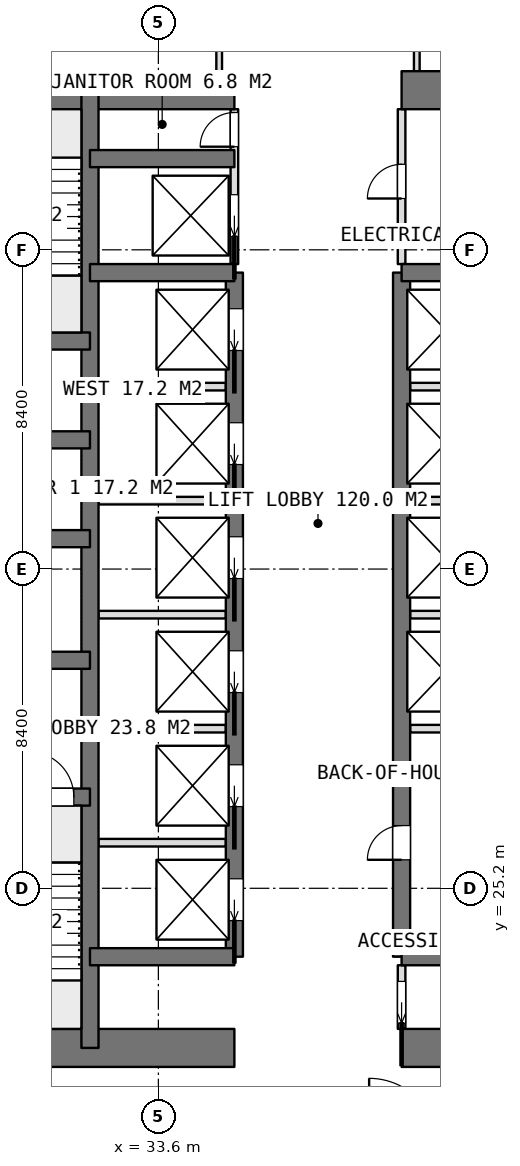
"""IFC4 building model, lengths in metres.
Left out: names, types, materials, properties, quantities, classifications, styles, units other than length and angle.
Written with IfcOpenShell. Run it as: python <this file> out.ifc"""

import sys

from ifc_helpers import new_model, si_unit, direction, frame, frame_2d, origin, place, context, subcontext, project, spatial, rectangle, extrude, element, fill, save


model = new_model("IFC4")
c1 = context("Model", 3, precision=1e-05, world=origin(), true_north=direction((0.0, 1.0)))
c2 = subcontext(c1, "Body", "Model", "MODEL_VIEW")
j1 = project(units=[si_unit("LENGTHUNIT", "METRE"), si_unit("PLANEANGLEUNIT", "RADIAN")], contexts=[c1])
p1 = place(None, origin())
s1 = spatial("IfcSite", under=j1, at=p1, CompositionType="ELEMENT")
p2 = place(p1, origin())
s2 = spatial("IfcBuilding", under=s1, at=p2, CompositionType="ELEMENT")
p3 = place(p2, frame((0.0, 0.0, 147.8)))
s3 = spatial("IfcBuildingStorey", under=s2, at=p3, CompositionType="ELEMENT", Elevation=147.8)
p4 = place(p3, frame((25.2, 21.0, 0.0), z_axis=(0.0, 0.0, 1.0), x_axis=(1.0, 0.0, 0.0)))
e1 = element("IfcWall", 1, at=p4, inside=s3, PredefinedType="SHEAR", context=c2, shape_type="SweptSolid", body=[
    extrude(rectangle(XDim=10.4, YDim=1.0, at=frame_2d((5.2, 0.0))), origin(), (0.0, 0.0, 1.0), 3.75),
])
p5 = place(p3, frame((40.0, 21.0, 0.0), z_axis=(0.0, 0.0, 1.0), x_axis=(1.0, 0.0, 0.0)))
e2 = element("IfcWall", 2, at=p5, inside=s3, PredefinedType="SHEAR", context=c2, shape_type="SweptSolid", body=[
    extrude(rectangle(XDim=10.4, YDim=1.0, at=frame_2d((5.2, 0.0))), origin(), (0.0, 0.0, 1.0), 3.75),
])
p6 = place(p3, frame((25.2, 46.2, 0.0), z_axis=(0.0, 0.0, 1.0), x_axis=(1.0, 0.0, 0.0)))
e3 = element("IfcWall", 3, at=p6, inside=s3, PredefinedType="SHEAR", context=c2, shape_type="SweptSolid", body=[
    extrude(rectangle(XDim=10.4, YDim=1.0, at=frame_2d((5.2, 0.0))), origin(), (0.0, 0.0, 1.0), 3.75),
])
p7 = place(p3, frame((40.0, 46.2, 0.0), z_axis=(0.0, 0.0, 1.0), x_axis=(1.0, 0.0, 0.0)))
e4 = element("IfcWall", 4, at=p7, inside=s3, PredefinedType="SHEAR", context=c2, shape_type="SweptSolid", body=[
    extrude(rectangle(XDim=10.4, YDim=1.0, at=frame_2d((5.2, 0.0))), origin(), (0.0, 0.0, 1.0), 3.75),
])
p8 = place(p3, frame((31.8, 21.0, 0.0), z_axis=(0.0, 0.0, 1.0), x_axis=(0.0, 1.0, 0.0)))
e5 = element("IfcWall", 5, at=p8, inside=s3, PredefinedType="SHEAR", context=c2, shape_type="SweptSolid", body=[
    extrude(rectangle(XDim=25.2, YDim=0.45, at=frame_2d((12.6, 0.0))), origin(), (0.0, 0.0, 1.0), 3.75),
])
p9 = place(p3, frame((35.6, 23.4, 0.0), z_axis=(0.0, 0.0, 1.0), x_axis=(0.0, 1.0, 0.0)))
e6 = element("IfcWall", 6, at=p9, inside=s3, PredefinedType="SHEAR", context=c2, shape_type="SweptSolid", body=[
    extrude(rectangle(XDim=18.0, YDim=0.45, at=frame_2d((9.0, 0.0))), origin(), (0.0, 0.0, 1.0), 3.75),
])
p10 = place(p9, frame((0.95, 0.0, 0.0)))
e7 = element("IfcOpeningElement", 7, at=p10, cuts=e6, PredefinedType="OPENING", context=c2, shape_type="SweptSolid", body=[
    extrude(rectangle(XDim=1.1, YDim=2.1, at=frame_2d((0.55, 1.05))), frame((0.0, 0.235, 0.0), z_axis=(0.0, -1.0, 0.0), x_axis=(1.0, 0.0, 0.0)), (0.0, 0.0, 1.0), 0.47),
])
p11 = place(p9, frame((3.95, 0.0, 0.0)))
e8 = element("IfcOpeningElement", 8, at=p11, cuts=e6, PredefinedType="OPENING", context=c2, shape_type="SweptSolid", body=[
    extrude(rectangle(XDim=1.1, YDim=2.1, at=frame_2d((0.55, 1.05))), frame((0.0, 0.235, 0.0), z_axis=(0.0, -1.0, 0.0), x_axis=(1.0, 0.0, 0.0)), (0.0, 0.0, 1.0), 0.47),
])
p12 = place(p9, frame((6.95, 0.0, 0.0)))
e9 = element("IfcOpeningElement", 9, at=p12, cuts=e6, PredefinedType="OPENING", context=c2, shape_type="SweptSolid", body=[
    extrude(rectangle(XDim=1.1, YDim=2.1, at=frame_2d((0.55, 1.05))), frame((0.0, 0.235, 0.0), z_axis=(0.0, -1.0, 0.0), x_axis=(1.0, 0.0, 0.0)), (0.0, 0.0, 1.0), 0.47),
])
p13 = place(p9, frame((9.95, 0.0, 0.0)))
e10 = element("IfcOpeningElement", 10, at=p13, cuts=e6, PredefinedType="OPENING", context=c2, shape_type="SweptSolid", body=[
    extrude(rectangle(XDim=1.1, YDim=2.1, at=frame_2d((0.55, 1.05))), frame((0.0, 0.235, 0.0), z_axis=(0.0, -1.0, 0.0), x_axis=(1.0, 0.0, 0.0)), (0.0, 0.0, 1.0), 0.47),
])
p14 = place(p9, frame((12.95, 0.0, 0.0)))
e11 = element("IfcOpeningElement", 11, at=p14, cuts=e6, PredefinedType="OPENING", context=c2, shape_type="SweptSolid", body=[
    extrude(rectangle(XDim=1.1, YDim=2.1, at=frame_2d((0.55, 1.05))), frame((0.0, 0.235, 0.0), z_axis=(0.0, -1.0, 0.0), x_axis=(1.0, 0.0, 0.0)), (0.0, 0.0, 1.0), 0.47),
])
p15 = place(p9, frame((15.95, 0.0, 0.0)))
e12 = element("IfcOpeningElement", 12, at=p15, cuts=e6, PredefinedType="OPENING", context=c2, shape_type="SweptSolid", body=[
    extrude(rectangle(XDim=1.1, YDim=2.1, at=frame_2d((0.55, 1.05))), frame((0.0, 0.235, 0.0), z_axis=(0.0, -1.0, 0.0), x_axis=(1.0, 0.0, 0.0)), (0.0, 0.0, 1.0), 0.47),
])
p16 = place(p3, frame((40.0, 23.4, 0.0), z_axis=(0.0, 0.0, 1.0), x_axis=(0.0, 1.0, 0.0)))
e13 = element("IfcWall", 13, at=p16, inside=s3, PredefinedType="SHEAR", context=c2, shape_type="SweptSolid", body=[
    extrude(rectangle(XDim=18.0, YDim=0.45, at=frame_2d((9.0, 0.0))), origin(), (0.0, 0.0, 1.0), 3.75),
])
p17 = place(p16, frame((2.55, 0.0, 0.0)))
e14 = element("IfcOpeningElement", 14, at=p17, cuts=e13, PredefinedType="OPENING", context=c2, shape_type="SweptSolid", body=[
    extrude(rectangle(XDim=0.9, YDim=2.1, at=frame_2d((0.45, 1.05))), frame((0.0, 0.235, 0.0), z_axis=(0.0, -1.0, 0.0), x_axis=(1.0, 0.0, 0.0)), (0.0, 0.0, 1.0), 0.47),
])
for number, where, z_axis, x_axis in (
    (15, (31.8, 23.4, 0.0), (0.0, 0.0, 1.0), (1.0, 0.0, 0.0)),
    (16, (31.8, 41.4, 0.0), (0.0, 0.0, 1.0), (1.0, 0.0, 0.0)),
    (17, (31.8, 44.4, 0.0), (0.0, 0.0, 1.0), (1.0, 0.0, 0.0)),
    (18, (40.0, 23.4, 0.0), (0.0, 0.0, 1.0), (1.0, 0.0, 0.0)),
    (19, (40.0, 41.4, 0.0), (0.0, 0.0, 1.0), (1.0, 0.0, 0.0)),
):
    element("IfcWall", number, at=place(p3, frame(where, z_axis=z_axis, x_axis=x_axis)), inside=s3, PredefinedType="SHEAR", context=c2, shape_type="SweptSolid", body=[
        extrude(rectangle(XDim=3.8, YDim=0.45, at=frame_2d((1.9, 0.0))), origin(), (0.0, 0.0, 1.0), 3.75),
    ])
p18 = place(p3, frame((25.2, 27.6, 0.0), z_axis=(0.0, 0.0, 1.0), x_axis=(1.0, 0.0, 0.0)))
e20 = element("IfcWall", 20, at=p18, inside=s3, PredefinedType="SHEAR", context=c2, shape_type="SweptSolid", body=[
    extrude(rectangle(XDim=6.6, YDim=0.45, at=frame_2d((3.3, 0.0))), origin(), (0.0, 0.0, 1.0), 3.75),
])
p19 = place(p18, frame((4.975, 0.0, 0.0)))
e21 = element("IfcOpeningElement", 21, at=p19, cuts=e20, PredefinedType="OPENING", context=c2, shape_type="SweptSolid", body=[
    extrude(rectangle(XDim=1.2, YDim=2.1, at=frame_2d((0.6, 1.05))), frame((0.0, 0.235, 0.0), z_axis=(0.0, -1.0, 0.0), x_axis=(1.0, 0.0, 0.0)), (0.0, 0.0, 1.0), 0.47),
])
p20 = place(p3, frame((25.2, 31.2, 0.0), z_axis=(0.0, 0.0, 1.0), x_axis=(1.0, 0.0, 0.0)))
e22 = element("IfcWall", 22, at=p20, inside=s3, PredefinedType="SHEAR", context=c2, shape_type="SweptSolid", body=[
    extrude(rectangle(XDim=6.6, YDim=0.45, at=frame_2d((3.3, 0.0))), origin(), (0.0, 0.0, 1.0), 3.75),
])
p21 = place(p20, frame((2.65, 0.0, 0.0)))
e23 = element("IfcOpeningElement", 23, at=p21, cuts=e22, PredefinedType="OPENING", context=c2, shape_type="SweptSolid", body=[
    extrude(rectangle(XDim=1.3, YDim=2.1, at=frame_2d((0.65, 1.05))), frame((0.0, 0.235, 0.0), z_axis=(0.0, -1.0, 0.0), x_axis=(1.0, 0.0, 0.0)), (0.0, 0.0, 1.0), 0.47),
])
for number, where, z_axis, x_axis in (
    (24, (25.2, 34.4, 0.0), (0.0, 0.0, 1.0), (1.0, 0.0, 0.0)),
    (25, (25.2, 37.0, 0.0), (0.0, 0.0, 1.0), (1.0, 0.0, 0.0)),
    (26, (25.2, 39.6, 0.0), (0.0, 0.0, 1.0), (1.0, 0.0, 0.0)),
):
    element("IfcWall", number, at=place(p3, frame(where, z_axis=z_axis, x_axis=x_axis)), inside=s3, PredefinedType="SHEAR", context=c2, shape_type="SweptSolid", body=[
        extrude(rectangle(XDim=6.6, YDim=0.45, at=frame_2d((3.3, 0.0))), origin(), (0.0, 0.0, 1.0), 3.75),
    ])
for number, where, z_axis, x_axis in (
    (27, (32.025, 26.4, 0.0), (0.0, 0.0, 1.0), (1.0, 0.0, 0.0)),
    (28, (32.025, 29.4, 0.0), (0.0, 0.0, 1.0), (1.0, 0.0, 0.0)),
    (29, (32.025, 32.4, 0.0), (0.0, 0.0, 1.0), (1.0, 0.0, 0.0)),
    (30, (32.025, 35.4, 0.0), (0.0, 0.0, 1.0), (1.0, 0.0, 0.0)),
    (31, (32.025, 38.4, 0.0), (0.0, 0.0, 1.0), (1.0, 0.0, 0.0)),
):
    element("IfcWall", number, at=place(p3, frame(where, z_axis=z_axis, x_axis=x_axis)), inside=s3, PredefinedType="PARTITIONING", context=c2, shape_type="SweptSolid", body=[
        extrude(rectangle(XDim=3.35, YDim=0.2, at=frame_2d((1.675, 0.0))), origin(), (0.0, 0.0, 1.0), 3.5),
    ])
for number, where, z_axis, x_axis in (
    (32, (40.225, 29.4, 0.0), (0.0, 0.0, 1.0), (1.0, 0.0, 0.0)),
    (33, (40.225, 32.4, 0.0), (0.0, 0.0, 1.0), (1.0, 0.0, 0.0)),
    (34, (40.225, 35.4, 0.0), (0.0, 0.0, 1.0), (1.0, 0.0, 0.0)),
    (35, (40.225, 38.4, 0.0), (0.0, 0.0, 1.0), (1.0, 0.0, 0.0)),
):
    element("IfcWall", number, at=place(p3, frame(where, z_axis=z_axis, x_axis=x_axis)), inside=s3, PredefinedType="PARTITIONING", context=c2, shape_type="SweptSolid", body=[
        extrude(rectangle(XDim=3.35, YDim=0.2, at=frame_2d((1.675, 0.0))), origin(), (0.0, 0.0, 1.0), 3.5),
    ])
p22 = place(p3, frame((40.0, 21.5, 0.0), z_axis=(0.0, 0.0, 1.0), x_axis=(0.0, 1.0, 0.0)))
e36 = element("IfcWall", 36, at=p22, inside=s3, PredefinedType="PARTITIONING", context=c2, shape_type="SweptSolid", body=[
    extrude(rectangle(XDim=1.675, YDim=0.2, at=frame_2d((0.837, 0.0))), origin(), (0.0, 0.0, 1.0), 3.5),
])
p23 = place(p22, frame((0.15, 0.0, 0.0)))
e37 = element("IfcOpeningElement", 37, at=p23, cuts=e36, PredefinedType="OPENING", context=c2, shape_type="SweptSolid", body=[
    extrude(rectangle(XDim=1.1, YDim=2.1, at=frame_2d((0.55, 1.05))), frame((0.0, 0.11, 0.0), z_axis=(0.0, -1.0, 0.0), x_axis=(1.0, 0.0, 0.0)), (0.0, 0.0, 1.0), 0.22),
])
p24 = place(p3, frame((40.0, 41.625, 0.0), z_axis=(0.0, 0.0, 1.0), x_axis=(0.0, 1.0, 0.0)))
e38 = element("IfcWall", 38, at=p24, inside=s3, PredefinedType="PARTITIONING", context=c2, shape_type="SweptSolid", body=[
    extrude(rectangle(XDim=4.075, YDim=0.2, at=frame_2d((2.038, 0.0))), origin(), (0.0, 0.0, 1.0), 3.5),
])
p25 = place(p24, frame((1.725, 0.0, 0.0)))
e39 = element("IfcOpeningElement", 39, at=p25, cuts=e38, PredefinedType="OPENING", context=c2, shape_type="SweptSolid", body=[
    extrude(rectangle(XDim=0.9, YDim=2.1, at=frame_2d((0.45, 1.05))), frame((0.0, 0.11, 0.0), z_axis=(0.0, -1.0, 0.0), x_axis=(1.0, 0.0, 0.0)), (0.0, 0.0, 1.0), 0.22),
])
p26 = place(p3, frame((35.6, 41.625, 0.0), z_axis=(0.0, 0.0, 1.0), x_axis=(0.0, 1.0, 0.0)))
e40 = element("IfcWall", 40, at=p26, inside=s3, PredefinedType="PARTITIONING", context=c2, shape_type="SweptSolid", body=[
    extrude(rectangle(XDim=4.075, YDim=0.2, at=frame_2d((2.038, 0.0))), origin(), (0.0, 0.0, 1.0), 3.5),
])
p27 = place(p26, frame((3.088, 0.0, 0.0)))
e41 = element("IfcOpeningElement", 41, at=p27, cuts=e40, PredefinedType="OPENING", context=c2, shape_type="SweptSolid", body=[
    extrude(rectangle(XDim=0.9, YDim=2.1, at=frame_2d((0.45, 1.05))), frame((0.0, 0.11, 0.0), z_axis=(0.0, -1.0, 0.0), x_axis=(1.0, 0.0, 0.0)), (0.0, 0.0, 1.0), 0.22),
])
p28 = place(p26, frame((0.725, 0.0, 0.0)))
e42 = element("IfcOpeningElement", 42, at=p28, cuts=e40, PredefinedType="OPENING", context=c2, shape_type="SweptSolid", body=[
    extrude(rectangle(XDim=1.1, YDim=2.1, at=frame_2d((0.55, 1.05))), frame((0.0, 0.11, 0.0), z_axis=(0.0, -1.0, 0.0), x_axis=(1.0, 0.0, 0.0)), (0.0, 0.0, 1.0), 0.22),
])
for number, where, z_axis, x_axis in (
    (43, (40.4, 46.7, 0.0), (0.0, 0.0, 1.0), (0.0, 1.0, 0.0)),
    (44, (35.2, 46.7, 0.0), (0.0, 0.0, 1.0), (0.0, 1.0, 0.0)),
):
    element("IfcWall", number, at=place(p3, frame(where, z_axis=z_axis, x_axis=x_axis)), inside=s3, PredefinedType="PARTITIONING", context=c2, shape_type="SweptSolid", body=[
        extrude(rectangle(XDim=2.625, YDim=0.15, at=frame_2d((1.312, 0.0))), origin(), (0.0, 0.0, 1.0), 3.5),
    ])
p29 = place(p23, origin())
e45 = element("IfcDoor", 45, at=p29, inside=s3, OperationType="SLIDING_TO_LEFT", PredefinedType="DOOR", context=c2, shape_type="SweptSolid", body=[
    extrude(rectangle(XDim=1.1, YDim=2.1, at=frame_2d((0.55, 1.05))), frame((0.0, 0.025, 0.0), z_axis=(0.0, -1.0, 0.0), x_axis=(1.0, 0.0, 0.0)), (0.0, 0.0, 1.0), 0.05),
])
fill(e37, e45)
p30 = place(p25, origin())
e46 = element("IfcDoor", 46, at=p30, inside=s3, OperationType="SINGLE_SWING_LEFT", PredefinedType="DOOR", context=c2, shape_type="SweptSolid", body=[
    extrude(rectangle(XDim=0.9, YDim=2.1, at=frame_2d((0.45, 1.05))), frame((0.0, 0.025, 0.0), z_axis=(0.0, -1.0, 0.0), x_axis=(1.0, 0.0, 0.0)), (0.0, 0.0, 1.0), 0.05),
])
fill(e39, e46)
p31 = place(p17, origin())
e47 = element("IfcDoor", 47, at=p31, inside=s3, OperationType="SINGLE_SWING_LEFT", PredefinedType="DOOR", context=c2, shape_type="SweptSolid", body=[
    extrude(rectangle(XDim=0.9, YDim=2.1, at=frame_2d((0.45, 1.05))), frame((0.0, 0.025, 0.0), z_axis=(0.0, -1.0, 0.0), x_axis=(1.0, 0.0, 0.0)), (0.0, 0.0, 1.0), 0.05),
])
fill(e14, e47)
p32 = place(p27, origin())
e48 = element("IfcDoor", 48, at=p32, inside=s3, OperationType="SINGLE_SWING_LEFT", PredefinedType="DOOR", context=c2, shape_type="SweptSolid", body=[
    extrude(rectangle(XDim=0.9, YDim=2.1, at=frame_2d((0.45, 1.05))), frame((0.0, 0.025, 0.0), z_axis=(0.0, -1.0, 0.0), x_axis=(1.0, 0.0, 0.0)), (0.0, 0.0, 1.0), 0.05),
])
fill(e41, e48)
p33 = place(p10, origin())
e49 = element("IfcDoor", 49, at=p33, inside=s3, OperationType="SLIDING_TO_LEFT", PredefinedType="USERDEFINED", context=c2, shape_type="SweptSolid", body=[
    extrude(rectangle(XDim=1.1, YDim=2.1, at=frame_2d((0.55, 1.05))), frame((0.0, 0.025, 0.0), z_axis=(0.0, -1.0, 0.0), x_axis=(1.0, 0.0, 0.0)), (0.0, 0.0, 1.0), 0.05),
])
fill(e7, e49)
p34 = place(p11, origin())
e50 = element("IfcDoor", 50, at=p34, inside=s3, OperationType="SLIDING_TO_LEFT", PredefinedType="USERDEFINED", context=c2, shape_type="SweptSolid", body=[
    extrude(rectangle(XDim=1.1, YDim=2.1, at=frame_2d((0.55, 1.05))), frame((0.0, 0.025, 0.0), z_axis=(0.0, -1.0, 0.0), x_axis=(1.0, 0.0, 0.0)), (0.0, 0.0, 1.0), 0.05),
])
fill(e8, e50)
p35 = place(p12, origin())
e51 = element("IfcDoor", 51, at=p35, inside=s3, OperationType="SLIDING_TO_LEFT", PredefinedType="USERDEFINED", context=c2, shape_type="SweptSolid", body=[
    extrude(rectangle(XDim=1.1, YDim=2.1, at=frame_2d((0.55, 1.05))), frame((0.0, 0.025, 0.0), z_axis=(0.0, -1.0, 0.0), x_axis=(1.0, 0.0, 0.0)), (0.0, 0.0, 1.0), 0.05),
])
fill(e9, e51)
p36 = place(p13, origin())
e52 = element("IfcDoor", 52, at=p36, inside=s3, OperationType="SLIDING_TO_LEFT", PredefinedType="USERDEFINED", context=c2, shape_type="SweptSolid", body=[
    extrude(rectangle(XDim=1.1, YDim=2.1, at=frame_2d((0.55, 1.05))), frame((0.0, 0.025, 0.0), z_axis=(0.0, -1.0, 0.0), x_axis=(1.0, 0.0, 0.0)), (0.0, 0.0, 1.0), 0.05),
])
fill(e10, e52)
p37 = place(p14, origin())
e53 = element("IfcDoor", 53, at=p37, inside=s3, OperationType="SLIDING_TO_LEFT", PredefinedType="USERDEFINED", context=c2, shape_type="SweptSolid", body=[
    extrude(rectangle(XDim=1.1, YDim=2.1, at=frame_2d((0.55, 1.05))), frame((0.0, 0.025, 0.0), z_axis=(0.0, -1.0, 0.0), x_axis=(1.0, 0.0, 0.0)), (0.0, 0.0, 1.0), 0.05),
])
fill(e11, e53)
p38 = place(p15, origin())
e54 = element("IfcDoor", 54, at=p38, inside=s3, OperationType="SLIDING_TO_LEFT", PredefinedType="USERDEFINED", context=c2, shape_type="SweptSolid", body=[
    extrude(rectangle(XDim=1.1, YDim=2.1, at=frame_2d((0.55, 1.05))), frame((0.0, 0.025, 0.0), z_axis=(0.0, -1.0, 0.0), x_axis=(1.0, 0.0, 0.0)), (0.0, 0.0, 1.0), 0.05),
])
fill(e12, e54)
p39 = place(p28, origin())
e55 = element("IfcDoor", 55, at=p39, inside=s3, OperationType="SLIDING_TO_LEFT", PredefinedType="USERDEFINED", context=c2, shape_type="SweptSolid", body=[
    extrude(rectangle(XDim=1.1, YDim=2.1, at=frame_2d((0.55, 1.05))), frame((0.0, 0.025, 0.0), z_axis=(0.0, -1.0, 0.0), x_axis=(1.0, 0.0, 0.0)), (0.0, 0.0, 1.0), 0.05),
])
fill(e42, e55)
p40 = place(p19, origin())
e56 = element("IfcDoor", 56, at=p40, inside=s3, OperationType="SINGLE_SWING_RIGHT", PredefinedType="DOOR", context=c2, shape_type="SweptSolid", body=[
    extrude(rectangle(XDim=1.2, YDim=2.1, at=frame_2d((0.6, 1.05))), frame((0.0, 0.025, 0.0), z_axis=(0.0, -1.0, 0.0), x_axis=(1.0, 0.0, 0.0)), (0.0, 0.0, 1.0), 0.05),
])
fill(e21, e56)
save(model, sys.argv[1])
